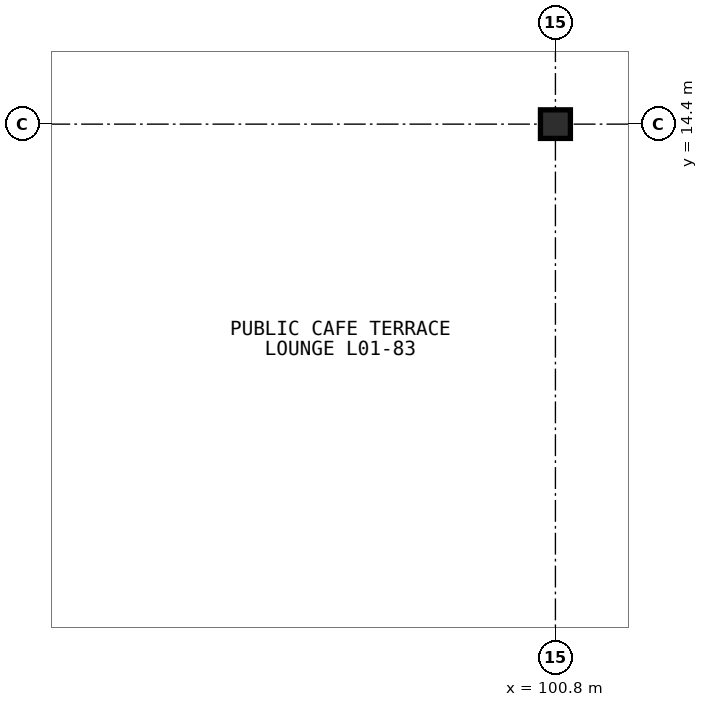
"""IFC4 building model, lengths in metres.
Left out: names, types, materials, properties, quantities, classifications, styles, units other than length and angle.
Written with IfcOpenShell. Run it as: python <this file> out.ifc"""

import sys

from ifc_helpers import new_model, si_unit, direction, frame, origin, origin_2d, place, context, subcontext, project, spatial, i_section, extrude, element, save


model = new_model("IFC4")
c1 = context("Model", 3, precision=1e-05, world=origin(), true_north=direction((0.0, 1.0)))
c2 = subcontext(c1, "Body", "Model", "MODEL_VIEW")
j1 = project(units=[si_unit("LENGTHUNIT", "METRE"), si_unit("PLANEANGLEUNIT", "RADIAN")], contexts=[c1])
p1 = place(None, origin())
s1 = spatial("IfcSite", under=j1, at=p1, CompositionType="ELEMENT")
p2 = place(p1, origin())
s2 = spatial("IfcBuilding", under=s1, at=p2, CompositionType="ELEMENT")
p3 = place(p2, origin())
s3 = spatial("IfcBuildingStorey", under=s2, at=p3, CompositionType="ELEMENT", Elevation=0.0)
p4 = place(p3, frame((100.8, 14.4, 0.0), z_axis=(0.0, 0.0, 1.0), x_axis=(1.0, 0.0, 0.0)))
e1 = element("IfcColumn", 1, at=p4, inside=s3, PredefinedType="COLUMN", context=c2, shape_type="SweptSolid", body=[
    extrude(i_section(OverallWidth=0.394, OverallDepth=0.376, WebThickness=0.017, FlangeThickness=0.028, FilletRadius=0.015, at=origin_2d()), origin(), (0.0, 0.0, 1.0), 5.4),
])
save(model, sys.argv[1])
